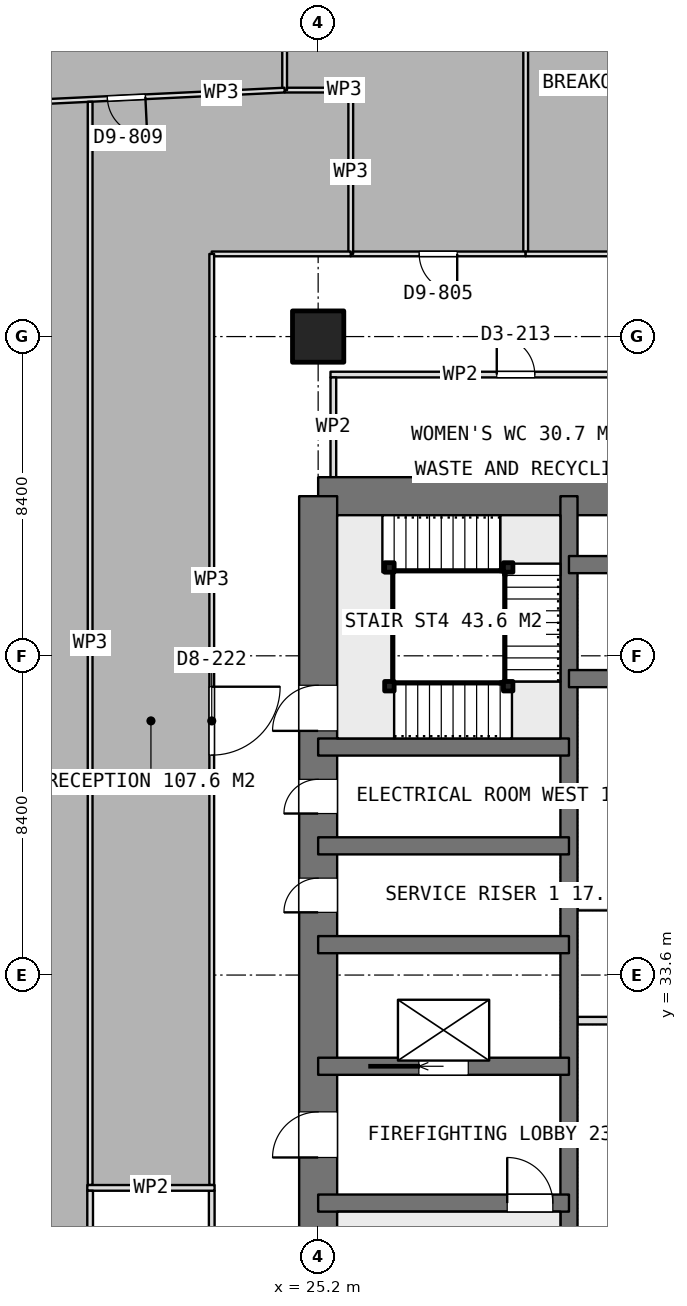
"""IFC4 building model, lengths in metres.
Left out: names, types, materials, properties, quantities, classifications, styles, units other than length and angle.
Written with IfcOpenShell. Run it as: python <this file> out.ifc"""

import sys

from ifc_helpers import new_model, si_unit, direction, frame, frame_2d, origin, origin_2d, place, context, subcontext, project, spatial, rectangle, extrude, element, fill, save


model = new_model("IFC4")
c1 = context("Model", 3, precision=1e-05, world=origin(), true_north=direction((0.0, 1.0)))
c2 = subcontext(c1, "Body", "Model", "MODEL_VIEW")
j1 = project(units=[si_unit("LENGTHUNIT", "METRE"), si_unit("PLANEANGLEUNIT", "RADIAN")], contexts=[c1])
p1 = place(None, origin())
s1 = spatial("IfcSite", under=j1, at=p1, CompositionType="ELEMENT")
p2 = place(p1, origin())
s2 = spatial("IfcBuilding", under=s1, at=p2, CompositionType="ELEMENT")
p3 = place(p2, frame((0.0, 0.0, 198.95)))
s3 = spatial("IfcBuildingStorey", under=s2, at=p3, CompositionType="ELEMENT", Elevation=198.95)
p4 = place(p3, frame((25.2, 46.2, 0.0), z_axis=(0.0, 0.0, 1.0), x_axis=(1.0, 0.0, 0.0)))
e1 = element("IfcWall", 1, at=p4, inside=s3, PredefinedType="SHEAR", context=c2, shape_type="SweptSolid", body=[
    extrude(rectangle(XDim=10.4, YDim=1.0, at=frame_2d((5.2, 0.0))), origin(), (0.0, 0.0, 1.0), 3.75),
])
p5 = place(p3, frame((25.2, 21.0, 0.0), z_axis=(0.0, 0.0, 1.0), x_axis=(0.0, 1.0, 0.0)))
e2 = element("IfcWall", 2, at=p5, inside=s3, PredefinedType="SHEAR", context=c2, shape_type="SweptSolid", body=[
    extrude(rectangle(XDim=25.2, YDim=1.0, at=frame_2d((12.6, 0.0))), origin(), (0.0, 0.0, 1.0), 3.75),
])
p6 = place(p5, frame((7.8, 0.0, 0.0)))
e3 = element("IfcOpeningElement", 3, at=p6, cuts=e2, PredefinedType="OPENING", context=c2, shape_type="SweptSolid", body=[
    extrude(rectangle(XDim=1.2, YDim=2.1, at=frame_2d((0.6, 1.05))), frame((0.0, 0.51, 0.0), z_axis=(0.0, -1.0, 0.0), x_axis=(1.0, 0.0, 0.0)), (0.0, 0.0, 1.0), 1.02),
])
p7 = place(p5, frame((14.25, 0.0, 0.0)))
e4 = element("IfcOpeningElement", 4, at=p7, cuts=e2, PredefinedType="OPENING", context=c2, shape_type="SweptSolid", body=[
    extrude(rectangle(XDim=0.9, YDim=2.1, at=frame_2d((0.45, 1.05))), frame((0.0, 0.51, 0.0), z_axis=(0.0, -1.0, 0.0), x_axis=(1.0, 0.0, 0.0)), (0.0, 0.0, 1.0), 1.02),
])
p8 = place(p5, frame((16.85, 0.0, 0.0)))
e5 = element("IfcOpeningElement", 5, at=p8, cuts=e2, PredefinedType="OPENING", context=c2, shape_type="SweptSolid", body=[
    extrude(rectangle(XDim=0.9, YDim=2.1, at=frame_2d((0.45, 1.05))), frame((0.0, 0.51, 0.0), z_axis=(0.0, -1.0, 0.0), x_axis=(1.0, 0.0, 0.0)), (0.0, 0.0, 1.0), 1.02),
])
p9 = place(p5, frame((19.025, 0.0, 0.0)))
e6 = element("IfcOpeningElement", 6, at=p9, cuts=e2, PredefinedType="OPENING", context=c2, shape_type="SweptSolid", body=[
    extrude(rectangle(XDim=1.2, YDim=2.1, at=frame_2d((0.6, 1.05))), frame((0.0, 0.51, 0.0), z_axis=(0.0, -1.0, 0.0), x_axis=(1.0, 0.0, 0.0)), (0.0, 0.0, 1.0), 1.02),
])
p10 = place(p3, frame((31.8, 21.0, 0.0), z_axis=(0.0, 0.0, 1.0), x_axis=(0.0, 1.0, 0.0)))
e7 = element("IfcWall", 7, at=p10, inside=s3, PredefinedType="SHEAR", context=c2, shape_type="SweptSolid", body=[
    extrude(rectangle(XDim=25.2, YDim=0.45, at=frame_2d((12.6, 0.0))), origin(), (0.0, 0.0, 1.0), 3.75),
])
for number, where, z_axis, x_axis in (
    (8, (31.8, 41.4, 0.0), (0.0, 0.0, 1.0), (1.0, 0.0, 0.0)),
    (9, (31.8, 44.4, 0.0), (0.0, 0.0, 1.0), (1.0, 0.0, 0.0)),
):
    element("IfcWall", number, at=place(p3, frame(where, z_axis=z_axis, x_axis=x_axis)), inside=s3, PredefinedType="SHEAR", context=c2, shape_type="SweptSolid", body=[
        extrude(rectangle(XDim=3.8, YDim=0.45, at=frame_2d((1.9, 0.0))), origin(), (0.0, 0.0, 1.0), 3.75),
    ])
p11 = place(p3, frame((25.2, 27.6, 0.0), z_axis=(0.0, 0.0, 1.0), x_axis=(1.0, 0.0, 0.0)))
e10 = element("IfcWall", 10, at=p11, inside=s3, PredefinedType="SHEAR", context=c2, shape_type="SweptSolid", body=[
    extrude(rectangle(XDim=6.6, YDim=0.45, at=frame_2d((3.3, 0.0))), origin(), (0.0, 0.0, 1.0), 3.75),
])
p12 = place(p11, frame((4.975, 0.0, 0.0)))
e11 = element("IfcOpeningElement", 11, at=p12, cuts=e10, PredefinedType="OPENING", context=c2, shape_type="SweptSolid", body=[
    extrude(rectangle(XDim=1.2, YDim=2.1, at=frame_2d((0.6, 1.05))), frame((0.0, 0.235, 0.0), z_axis=(0.0, -1.0, 0.0), x_axis=(1.0, 0.0, 0.0)), (0.0, 0.0, 1.0), 0.47),
])
p13 = place(p3, frame((25.2, 31.2, 0.0), z_axis=(0.0, 0.0, 1.0), x_axis=(1.0, 0.0, 0.0)))
e12 = element("IfcWall", 12, at=p13, inside=s3, PredefinedType="SHEAR", context=c2, shape_type="SweptSolid", body=[
    extrude(rectangle(XDim=6.6, YDim=0.45, at=frame_2d((3.3, 0.0))), origin(), (0.0, 0.0, 1.0), 3.75),
])
p14 = place(p13, frame((2.65, 0.0, 0.0)))
e13 = element("IfcOpeningElement", 13, at=p14, cuts=e12, PredefinedType="OPENING", context=c2, shape_type="SweptSolid", body=[
    extrude(rectangle(XDim=1.3, YDim=2.1, at=frame_2d((0.65, 1.05))), frame((0.0, 0.235, 0.0), z_axis=(0.0, -1.0, 0.0), x_axis=(1.0, 0.0, 0.0)), (0.0, 0.0, 1.0), 0.47),
])
for number, where, z_axis, x_axis in (
    (14, (25.2, 34.4, 0.0), (0.0, 0.0, 1.0), (1.0, 0.0, 0.0)),
    (15, (25.2, 37.0, 0.0), (0.0, 0.0, 1.0), (1.0, 0.0, 0.0)),
    (16, (25.2, 39.6, 0.0), (0.0, 0.0, 1.0), (1.0, 0.0, 0.0)),
):
    element("IfcWall", number, at=place(p3, frame(where, z_axis=z_axis, x_axis=x_axis)), inside=s3, PredefinedType="SHEAR", context=c2, shape_type="SweptSolid", body=[
        extrude(rectangle(XDim=6.6, YDim=0.45, at=frame_2d((3.3, 0.0))), origin(), (0.0, 0.0, 1.0), 3.75),
    ])
p15 = place(p3, frame((25.2, 50.4, 0.0), z_axis=(0.0, 0.0, 1.0), x_axis=(1.0, 0.0, 0.0)))
e17 = element("IfcColumn", 17, at=p15, inside=s3, PredefinedType="COLUMN", context=c2, shape_type="SweptSolid", body=[
    extrude(rectangle(XDim=1.35, YDim=1.35, at=origin_2d()), origin(), (0.0, 0.0, 1.0), 3.75),
])
for number, where, z_axis, x_axis in (
    (18, (32.025, 29.4, 0.0), (0.0, 0.0, 1.0), (1.0, 0.0, 0.0)),
    (19, (32.025, 32.4, 0.0), (0.0, 0.0, 1.0), (1.0, 0.0, 0.0)),
    (20, (32.025, 35.4, 0.0), (0.0, 0.0, 1.0), (1.0, 0.0, 0.0)),
    (21, (32.025, 38.4, 0.0), (0.0, 0.0, 1.0), (1.0, 0.0, 0.0)),
):
    element("IfcWall", number, at=place(p3, frame(where, z_axis=z_axis, x_axis=x_axis)), inside=s3, PredefinedType="PARTITIONING", context=c2, shape_type="SweptSolid", body=[
        extrude(rectangle(XDim=3.35, YDim=0.2, at=frame_2d((1.675, 0.0))), origin(), (0.0, 0.0, 1.0), 3.5),
    ])
p16 = place(p3, frame((25.525, 49.4, 0.0), z_axis=(0.0, 0.0, 1.0), x_axis=(1.0, 0.0, 0.0)))
e22 = element("IfcWall", 22, at=p16, inside=s3, PredefinedType="PARTITIONING", context=c2, shape_type="SweptSolid", body=[
    extrude(rectangle(XDim=9.75, YDim=0.15, at=frame_2d((4.875, 0.0))), origin(), (0.0, 0.0, 1.0), 3.5),
])
p17 = place(p16, frame((4.375, 0.0, 0.0)))
e23 = element("IfcOpeningElement", 23, at=p17, cuts=e22, PredefinedType="OPENING", context=c2, shape_type="SweptSolid", body=[
    extrude(rectangle(XDim=1.0, YDim=2.1, at=frame_2d((0.5, 1.05))), frame((0.0, 0.085, 0.0), z_axis=(0.0, -1.0, 0.0), x_axis=(1.0, 0.0, 0.0)), (0.0, 0.0, 1.0), 0.17),
])
p18 = place(p3, frame((25.6, 46.7, 0.0), z_axis=(0.0, 0.0, 1.0), x_axis=(0.0, 1.0, 0.0)))
e24 = element("IfcWall", 24, at=p18, inside=s3, PredefinedType="PARTITIONING", context=c2, shape_type="SweptSolid", body=[
    extrude(rectangle(XDim=2.625, YDim=0.15, at=frame_2d((1.312, 0.0))), origin(), (0.0, 0.0, 1.0), 3.5),
])
p19 = place(p3, frame((19.125, 28.0, 0.0), z_axis=(0.0, 0.0, 1.0), x_axis=(1.0, 0.0, 0.0)))
e25 = element("IfcWall", 25, at=p19, inside=s3, PredefinedType="PARTITIONING", context=c2, shape_type="SweptSolid", body=[
    extrude(rectangle(XDim=3.35, YDim=0.15, at=frame_2d((1.675, 0.0))), origin(), (0.0, 0.0, 1.0), 3.5),
])
p20 = place(p3, frame((19.2, 21.075, 0.0), z_axis=(0.0, 0.0, 1.0), x_axis=(0.0, 1.0, 0.0)))
e26 = element("IfcWall", 26, at=p20, inside=s3, PredefinedType="PARTITIONING", context=c2, shape_type="SweptSolid", body=[
    extrude(rectangle(XDim=6.85, YDim=0.15, at=frame_2d((3.425, 0.0))), origin(), (0.0, 0.0, 1.0), 3.5),
])
p21 = place(p3, frame((22.4, 21.075, 0.0), z_axis=(0.0, 0.0, 1.0), x_axis=(0.0, 1.0, 0.0)))
e27 = element("IfcWall", 27, at=p21, inside=s3, PredefinedType="PARTITIONING", context=c2, shape_type="SweptSolid", body=[
    extrude(rectangle(XDim=6.85, YDim=0.15, at=frame_2d((3.425, 0.0))), origin(), (0.0, 0.0, 1.0), 3.5),
])
p22 = place(p21, frame((2.925, 0.0, 0.0)))
e28 = element("IfcOpeningElement", 28, at=p22, cuts=e27, PredefinedType="OPENING", context=c2, shape_type="SweptSolid", body=[
    extrude(rectangle(XDim=1.0, YDim=2.1, at=frame_2d((0.5, 1.05))), frame((0.0, 0.085, 0.0), z_axis=(0.0, -1.0, 0.0), x_axis=(1.0, 0.0, 0.0)), (0.0, 0.0, 1.0), 0.17),
])
p23 = place(p3, frame((30.661, 61.313, 0.0), z_axis=(0.0, 0.0, 1.0), x_axis=(0.0, -1.0, 0.0)))
e29 = element("IfcWall", 29, at=p23, inside=s3, PredefinedType="PARTITIONING", context=c2, shape_type="SweptSolid", body=[
    extrude(rectangle(XDim=8.738, YDim=0.125, at=frame_2d((4.369, 0.0))), origin(), (0.0, 0.0, 1.0), 3.5),
])
p24 = place(p3, frame((30.661, 52.575, 0.0), z_axis=(0.0, 0.0, 1.0), x_axis=(-1.0, 0.0, 0.0)))
e30 = element("IfcWall", 30, at=p24, inside=s3, PredefinedType="PARTITIONING", context=c2, shape_type="SweptSolid", body=[
    extrude(rectangle(XDim=4.603, YDim=0.125, at=frame_2d((2.301, 0.0))), origin(), (0.0, 0.0, 1.0), 3.5),
])
p25 = place(p24, frame((1.802, 0.0, 0.0)))
e31 = element("IfcOpeningElement", 31, at=p25, cuts=e30, PredefinedType="OPENING", context=c2, shape_type="SweptSolid", body=[
    extrude(rectangle(XDim=1.0, YDim=2.1, at=frame_2d((0.5, 1.05))), frame((0.0, 0.073, 0.0), z_axis=(0.0, -1.0, 0.0), x_axis=(1.0, 0.0, 0.0)), (0.0, 0.0, 1.0), 0.145),
])
p26 = place(p3, frame((26.058, 52.575, 0.0), z_axis=(0.0, 0.0, 1.0), x_axis=(0.0, 1.0, 0.0)))
e32 = element("IfcWall", 32, at=p26, inside=s3, PredefinedType="PARTITIONING", context=c2, shape_type="SweptSolid", body=[
    extrude(rectangle(XDim=4.31, YDim=0.125, at=frame_2d((2.155, 0.0))), origin(), (0.0, 0.0, 1.0), 3.5),
])
p27 = place(p3, frame((26.058, 56.885, 0.0), z_axis=(0.0, 0.0, 1.0), x_axis=(-1.0, 0.0, 0.0)))
e33 = element("IfcWall", 33, at=p27, inside=s3, PredefinedType="PARTITIONING", context=c2, shape_type="SweptSolid", body=[
    extrude(rectangle(XDim=1.736, YDim=0.125, at=frame_2d((0.868, 0.0))), origin(), (0.0, 0.0, 1.0), 3.5),
])
p28 = place(p3, frame((24.318, 56.885, 0.0), z_axis=(0.0, 0.0, 1.0), x_axis=(0.0, 1.0, 0.0)))
e34 = element("IfcWall", 34, at=p28, inside=s3, PredefinedType="PARTITIONING", context=c2, shape_type="SweptSolid", body=[
    extrude(rectangle(XDim=4.125, YDim=0.125, at=frame_2d((2.062, 0.0))), origin(), (0.0, 0.0, 1.0), 3.5),
])
p29 = place(p3, frame((24.317, 56.885, 0.0), z_axis=(0.0, 0.0, 1.0), x_axis=(-0.998859973319, -0.047736293327, 0.0)))
e35 = element("IfcWall", 35, at=p29, inside=s3, PredefinedType="PARTITIONING", context=c2, shape_type="SweptSolid", body=[
    extrude(rectangle(XDim=8.336, YDim=0.125, at=frame_2d((4.168, 0.0))), origin(), (0.0, 0.0, 1.0), 3.5),
])
p30 = place(p29, frame((3.668, 0.0, 0.0)))
e36 = element("IfcOpeningElement", 36, at=p30, cuts=e35, PredefinedType="OPENING", context=c2, shape_type="SweptSolid", body=[
    extrude(rectangle(XDim=1.0, YDim=2.1, at=frame_2d((0.5, 1.05))), frame((0.0, 0.073, 0.0), z_axis=(0.0, -1.0, 0.0), x_axis=(1.0, 0.0, 0.0)), (0.0, 0.0, 1.0), 0.145),
])
p31 = place(p3, frame((26.058, 52.575, 0.0), z_axis=(0.0, 0.0, 1.0), x_axis=(-1.0, 0.0, 0.0)))
e37 = element("IfcWall", 37, at=p31, inside=s3, PredefinedType="PARTITIONING", context=c2, shape_type="SweptSolid", body=[
    extrude(rectangle(XDim=3.658, YDim=0.125, at=frame_2d((1.829, 0.0))), origin(), (0.0, 0.0, 1.0), 3.5),
])
p32 = place(p3, frame((22.4, 52.575, 0.0), z_axis=(0.0, 0.0, 1.0), x_axis=(0.0, -1.0, 0.0)))
e38 = element("IfcWall", 38, at=p32, inside=s3, PredefinedType="PARTITIONING", context=c2, shape_type="SweptSolid", body=[
    extrude(rectangle(XDim=24.5, YDim=0.125, at=frame_2d((12.25, 0.0))), origin(), (0.0, 0.0, 1.0), 3.5),
])
p33 = place(p32, frame((11.388, 0.0, 0.0)))
e39 = element("IfcOpeningElement", 39, at=p33, cuts=e38, PredefinedType="OPENING", context=c2, shape_type="SweptSolid", body=[
    extrude(rectangle(XDim=1.8, YDim=2.1, at=frame_2d((0.9, 1.05))), frame((0.0, 0.073, 0.0), z_axis=(0.0, -1.0, 0.0), x_axis=(1.0, 0.0, 0.0)), (0.0, 0.0, 1.0), 0.145),
])
p34 = place(p3, frame((19.2, 28.075, 0.0), z_axis=(0.0, 0.0, 1.0), x_axis=(0.0, 1.0, 0.0)))
e40 = element("IfcWall", 40, at=p34, inside=s3, PredefinedType="PARTITIONING", context=c2, shape_type="SweptSolid", body=[
    extrude(rectangle(XDim=28.503, YDim=0.125, at=frame_2d((14.251, 0.0))), origin(), (0.0, 0.0, 1.0), 3.5),
])
p35 = place(p3, frame((38.57, 52.575, 0.0), z_axis=(0.0, 0.0, 1.0), x_axis=(-1.0, 0.0, 0.0)))
e41 = element("IfcWall", 41, at=p35, inside=s3, PredefinedType="PARTITIONING", context=c2, shape_type="SweptSolid", body=[
    extrude(rectangle(XDim=7.909, YDim=0.125, at=frame_2d((3.955, 0.0))), origin(), (0.0, 0.0, 1.0), 3.5),
])
p36 = place(p35, frame((3.455, 0.0, 0.0)))
e42 = element("IfcOpeningElement", 42, at=p36, cuts=e41, PredefinedType="OPENING", context=c2, shape_type="SweptSolid", body=[
    extrude(rectangle(XDim=1.0, YDim=2.1, at=frame_2d((0.5, 1.05))), frame((0.0, 0.073, 0.0), z_axis=(0.0, -1.0, 0.0), x_axis=(1.0, 0.0, 0.0)), (0.0, 0.0, 1.0), 0.145),
])
for number, where, z_axis, x_axis in (
    (43, (27.075, 41.2, 0.0), (0.0, 0.0, 1.0), (1.0, 0.0, 0.0)),
    (44, (30.2, 41.2, 0.0), (0.0, 0.0, 1.0), (1.0, 0.0, 0.0)),
    (45, (30.2, 44.325, 0.0), (0.0, 0.0, 1.0), (1.0, 0.0, 0.0)),
    (46, (27.075, 44.325, 0.0), (0.0, 0.0, 1.0), (1.0, 0.0, 0.0)),
):
    element("IfcColumn", number, at=place(p3, frame(where, z_axis=z_axis, x_axis=x_axis)), inside=s3, PredefinedType="COLUMN", context=c2, shape_type="SweptSolid", body=[
        extrude(rectangle(XDim=0.25, YDim=0.25, at=origin_2d()), origin(), (0.0, 0.0, 1.0), 3.75),
    ])
p37 = place(p6, origin())
e47 = element("IfcDoor", 47, at=p37, inside=s3, OperationType="SINGLE_SWING_LEFT", PredefinedType="DOOR", context=c2, shape_type="SweptSolid", body=[
    extrude(rectangle(XDim=1.2, YDim=2.1, at=frame_2d((0.6, 1.05))), frame((0.0, 0.025, 0.0), z_axis=(0.0, -1.0, 0.0), x_axis=(1.0, 0.0, 0.0)), (0.0, 0.0, 1.0), 0.05),
])
fill(e3, e47)
p38 = place(p7, origin())
e48 = element("IfcDoor", 48, at=p38, inside=s3, OperationType="SINGLE_SWING_LEFT", PredefinedType="DOOR", context=c2, shape_type="SweptSolid", body=[
    extrude(rectangle(XDim=0.9, YDim=2.1, at=frame_2d((0.45, 1.05))), frame((0.0, 0.025, 0.0), z_axis=(0.0, -1.0, 0.0), x_axis=(1.0, 0.0, 0.0)), (0.0, 0.0, 1.0), 0.05),
])
fill(e4, e48)
p39 = place(p8, origin())
e49 = element("IfcDoor", 49, at=p39, inside=s3, OperationType="SINGLE_SWING_LEFT", PredefinedType="DOOR", context=c2, shape_type="SweptSolid", body=[
    extrude(rectangle(XDim=0.9, YDim=2.1, at=frame_2d((0.45, 1.05))), frame((0.0, 0.025, 0.0), z_axis=(0.0, -1.0, 0.0), x_axis=(1.0, 0.0, 0.0)), (0.0, 0.0, 1.0), 0.05),
])
fill(e5, e49)
p40 = place(p14, origin())
e50 = element("IfcDoor", 50, at=p40, inside=s3, OperationType="SLIDING_TO_LEFT", PredefinedType="USERDEFINED", context=c2, shape_type="SweptSolid", body=[
    extrude(rectangle(XDim=1.3, YDim=2.1, at=frame_2d((0.65, 1.05))), frame((0.0, 0.025, 0.0), z_axis=(0.0, -1.0, 0.0), x_axis=(1.0, 0.0, 0.0)), (0.0, 0.0, 1.0), 0.05),
])
fill(e13, e50)
p41 = place(p17, origin())
e51 = element("IfcDoor", 51, at=p41, inside=s3, OperationType="SINGLE_SWING_LEFT", PredefinedType="DOOR", context=c2, shape_type="SweptSolid", body=[
    extrude(rectangle(XDim=1.0, YDim=2.1, at=frame_2d((0.5, 1.05))), frame((0.0, 0.025, 0.0), z_axis=(0.0, -1.0, 0.0), x_axis=(1.0, 0.0, 0.0)), (0.0, 0.0, 1.0), 0.05),
])
fill(e23, e51)
p42 = place(p25, origin())
e52 = element("IfcDoor", 52, at=p42, inside=s3, OperationType="SINGLE_SWING_LEFT", PredefinedType="DOOR", context=c2, shape_type="SweptSolid", body=[
    extrude(rectangle(XDim=1.0, YDim=2.1, at=frame_2d((0.5, 1.05))), frame((0.0, 0.025, 0.0), z_axis=(0.0, -1.0, 0.0), x_axis=(1.0, 0.0, 0.0)), (0.0, 0.0, 1.0), 0.05),
])
fill(e31, e52)
p43 = place(p33, origin())
e53 = element("IfcDoor", 53, at=p43, inside=s3, OperationType="DOUBLE_DOOR_SINGLE_SWING", PredefinedType="DOOR", context=c2, shape_type="SweptSolid", body=[
    extrude(rectangle(XDim=1.8, YDim=2.1, at=frame_2d((0.9, 1.05))), frame((0.0, 0.025, 0.0), z_axis=(0.0, -1.0, 0.0), x_axis=(1.0, 0.0, 0.0)), (0.0, 0.0, 1.0), 0.05),
])
fill(e39, e53)
p44 = place(p30, origin())
e54 = element("IfcDoor", 54, at=p44, inside=s3, OperationType="SINGLE_SWING_LEFT", PredefinedType="DOOR", context=c2, shape_type="SweptSolid", body=[
    extrude(rectangle(XDim=1.0, YDim=2.1, at=frame_2d((0.5, 1.05))), frame((0.0, 0.025, 0.0), z_axis=(0.0, -1.0, 0.0), x_axis=(1.0, 0.0, 0.0)), (0.0, 0.0, 1.0), 0.05),
])
fill(e36, e54)
p45 = place(p12, origin())
e55 = element("IfcDoor", 55, at=p45, inside=s3, OperationType="SINGLE_SWING_RIGHT", PredefinedType="DOOR", context=c2, shape_type="SweptSolid", body=[
    extrude(rectangle(XDim=1.2, YDim=2.1, at=frame_2d((0.6, 1.05))), frame((0.0, 0.025, 0.0), z_axis=(0.0, -1.0, 0.0), x_axis=(1.0, 0.0, 0.0)), (0.0, 0.0, 1.0), 0.05),
])
fill(e11, e55)
p46 = place(p9, origin())
e56 = element("IfcDoor", 56, at=p46, inside=s3, OperationType="SINGLE_SWING_RIGHT", PredefinedType="DOOR", context=c2, shape_type="SweptSolid", body=[
    extrude(rectangle(XDim=1.2, YDim=2.1, at=frame_2d((0.6, 1.05))), frame((0.0, 0.025, 0.0), z_axis=(0.0, -1.0, 0.0), x_axis=(1.0, 0.0, 0.0)), (0.0, 0.0, 1.0), 0.05),
])
fill(e6, e56)
save(model, sys.argv[1])
